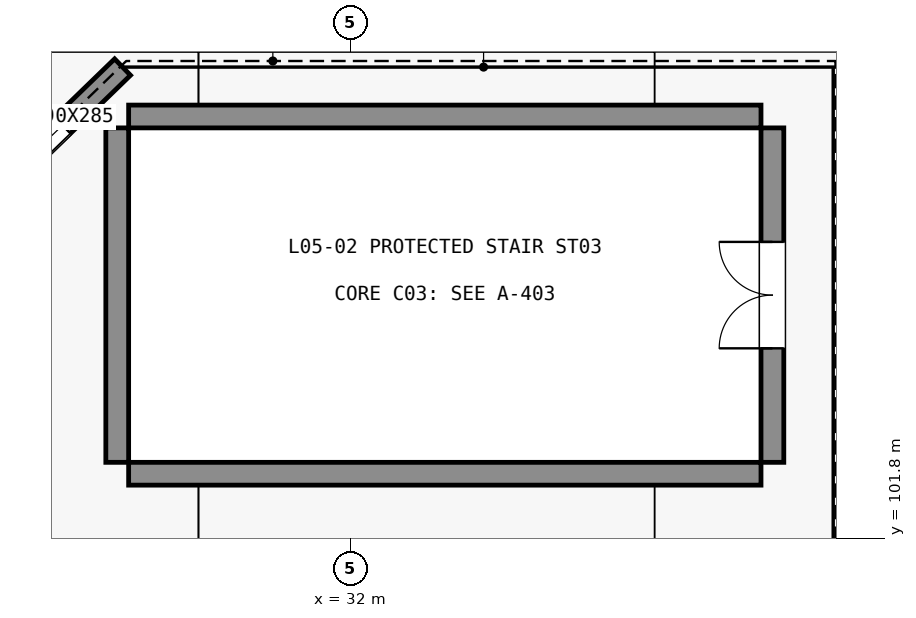
"""IFC4 building model, lengths in metres.
Left out: names, types, materials, properties, quantities, classifications, styles, units other than length and angle.
Written with IfcOpenShell. Run it as: python <this file> out.ifc"""

import sys

from ifc_helpers import new_model, si_unit, direction, frame, frame_2d, origin, place, context, subcontext, project, spatial, rectangle, extrude, element, fill, save


model = new_model("IFC4")
c1 = context("Model", 3, precision=1e-05, world=origin(), true_north=direction((0.0, 1.0)))
c2 = subcontext(c1, "Body", "Model", "MODEL_VIEW")
j1 = project(units=[si_unit("LENGTHUNIT", "METRE"), si_unit("PLANEANGLEUNIT", "RADIAN")], contexts=[c1])
p1 = place(None, origin())
s1 = spatial("IfcSite", under=j1, at=p1, CompositionType="ELEMENT")
p2 = place(p1, origin())
s2 = spatial("IfcBuilding", under=s1, at=p2, CompositionType="ELEMENT")
p3 = place(p2, frame((0.0, 0.0, 26.4)))
s3 = spatial("IfcBuildingStorey", under=s2, at=p3, CompositionType="ELEMENT", Elevation=26.4)
for number, where, z_axis, x_axis in (
    (1, (29.08, 102.65, 0.0), (0.0, 0.0, 1.0), (1.0, 0.0, 0.0)),
    (2, (29.08, 107.35, 0.0), (0.0, 0.0, 1.0), (1.0, 0.0, 0.0)),
):
    element("IfcWall", number, at=place(p3, frame(where, z_axis=z_axis, x_axis=x_axis)), inside=s3, PredefinedType="SHEAR", context=c2, shape_type="SweptSolid", body=[
        extrude(rectangle(XDim=8.32, YDim=0.3, at=frame_2d((4.16, 0.0))), origin(), (0.0, 0.0, 1.0), 5.18),
    ])
p4 = place(p3, frame((28.93, 102.8, 0.0), z_axis=(0.0, 0.0, 1.0), x_axis=(0.0, 1.0, 0.0)))
e3 = element("IfcWall", 3, at=p4, inside=s3, PredefinedType="SHEAR", context=c2, shape_type="SweptSolid", body=[
    extrude(rectangle(XDim=4.4, YDim=0.3, at=frame_2d((2.2, 0.0))), origin(), (0.0, 0.0, 1.0), 5.18),
])
p5 = place(p3, frame((37.55, 102.8, 0.0), z_axis=(0.0, 0.0, 1.0), x_axis=(0.0, 1.0, 0.0)))
e4 = element("IfcWall", 4, at=p5, inside=s3, PredefinedType="SHEAR", context=c2, shape_type="SweptSolid", body=[
    extrude(rectangle(XDim=4.4, YDim=0.3, at=frame_2d((2.2, 0.0))), origin(), (0.0, 0.0, 1.0), 5.18),
])
p6 = place(p5, frame((1.5, 0.0, 0.0)))
e5 = element("IfcOpeningElement", 5, at=p6, cuts=e4, PredefinedType="OPENING", context=c2, shape_type="SweptSolid", body=[
    extrude(rectangle(XDim=1.4, YDim=2.2, at=frame_2d((0.7, 1.1))), frame((0.0, 0.16, 0.0), z_axis=(0.0, -1.0, 0.0), x_axis=(1.0, 0.0, 0.0)), (0.0, 0.0, 1.0), 0.32),
])
p7 = place(p3, frame((29.0, 108.0, 0.0), z_axis=(0.0, 0.0, 1.0), x_axis=(-0.718244287729, -0.695791019736, 0.0)))
e6 = element("IfcWall", 6, at=p7, inside=s3, PredefinedType="STANDARD", context=c2, shape_type="SweptSolid", body=[
    extrude(rectangle(XDim=17.821, YDim=0.3, at=frame_2d((8.911, 0.0))), origin(), (0.0, 0.0, 1.0), 5.18),
])
p8 = place(p7, frame((1.1, 0.0, 0.95)))
e7 = element("IfcOpeningElement", 7, at=p8, cuts=e6, PredefinedType="OPENING", context=c2, shape_type="SweptSolid", body=[
    extrude(rectangle(XDim=0.9, YDim=2.85, at=frame_2d((0.45, 1.425))), frame((0.0, 0.16, 0.0), z_axis=(0.0, -1.0, 0.0), x_axis=(1.0, 0.0, 0.0)), (0.0, 0.0, 1.0), 0.32),
])
p9 = place(p7, frame((2.45, 0.0, 0.95)))
e8 = element("IfcOpeningElement", 8, at=p9, cuts=e6, PredefinedType="OPENING", context=c2, shape_type="SweptSolid", body=[
    extrude(rectangle(XDim=0.9, YDim=2.85, at=frame_2d((0.45, 1.425))), frame((0.0, 0.16, 0.0), z_axis=(0.0, -1.0, 0.0), x_axis=(1.0, 0.0, 0.0)), (0.0, 0.0, 1.0), 0.32),
])
p10 = place(p7, frame((7.5, 0.0, 0.95)))
e9 = element("IfcOpeningElement", 9, at=p10, cuts=e6, PredefinedType="OPENING", context=c2, shape_type="SweptSolid", body=[
    extrude(rectangle(XDim=0.9, YDim=2.85, at=frame_2d((0.45, 1.425))), frame((0.0, 0.16, 0.0), z_axis=(0.0, -1.0, 0.0), x_axis=(1.0, 0.0, 0.0)), (0.0, 0.0, 1.0), 0.32),
])
p11 = place(p7, frame((8.85, 0.0, 0.95)))
e10 = element("IfcOpeningElement", 10, at=p11, cuts=e6, PredefinedType="OPENING", context=c2, shape_type="SweptSolid", body=[
    extrude(rectangle(XDim=0.9, YDim=2.85, at=frame_2d((0.45, 1.425))), frame((0.0, 0.16, 0.0), z_axis=(0.0, -1.0, 0.0), x_axis=(1.0, 0.0, 0.0)), (0.0, 0.0, 1.0), 0.32),
])
p12 = place(p7, frame((10.7, 0.0, 0.95)))
e11 = element("IfcOpeningElement", 11, at=p12, cuts=e6, PredefinedType="OPENING", context=c2, shape_type="SweptSolid", body=[
    extrude(rectangle(XDim=0.9, YDim=2.85, at=frame_2d((0.45, 1.425))), frame((0.0, 0.16, 0.0), z_axis=(0.0, -1.0, 0.0), x_axis=(1.0, 0.0, 0.0)), (0.0, 0.0, 1.0), 0.32),
])
p13 = place(p7, frame((12.05, 0.0, 0.95)))
e12 = element("IfcOpeningElement", 12, at=p13, cuts=e6, PredefinedType="OPENING", context=c2, shape_type="SweptSolid", body=[
    extrude(rectangle(XDim=0.9, YDim=2.85, at=frame_2d((0.45, 1.425))), frame((0.0, 0.16, 0.0), z_axis=(0.0, -1.0, 0.0), x_axis=(1.0, 0.0, 0.0)), (0.0, 0.0, 1.0), 0.32),
])
p14 = place(p7, frame((13.9, 0.0, 0.95)))
e13 = element("IfcOpeningElement", 13, at=p14, cuts=e6, PredefinedType="OPENING", context=c2, shape_type="SweptSolid", body=[
    extrude(rectangle(XDim=0.9, YDim=2.85, at=frame_2d((0.45, 1.425))), frame((0.0, 0.16, 0.0), z_axis=(0.0, -1.0, 0.0), x_axis=(1.0, 0.0, 0.0)), (0.0, 0.0, 1.0), 0.32),
])
p15 = place(p7, frame((15.25, 0.0, 0.95)))
e14 = element("IfcOpeningElement", 14, at=p15, cuts=e6, PredefinedType="OPENING", context=c2, shape_type="SweptSolid", body=[
    extrude(rectangle(XDim=0.9, YDim=2.85, at=frame_2d((0.45, 1.425))), frame((0.0, 0.16, 0.0), z_axis=(0.0, -1.0, 0.0), x_axis=(1.0, 0.0, 0.0)), (0.0, 0.0, 1.0), 0.32),
])
p16 = place(p8, origin())
e15 = element("IfcWindow", 15, at=p16, inside=s3, PartitioningType="DOUBLE_PANEL_VERTICAL", PredefinedType="WINDOW", context=c2, shape_type="SweptSolid", body=[
    extrude(rectangle(XDim=0.9, YDim=2.85, at=frame_2d((0.45, 1.425))), frame((0.0, 0.03, 0.0), z_axis=(0.0, -1.0, 0.0), x_axis=(1.0, 0.0, 0.0)), (0.0, 0.0, 1.0), 0.06),
])
fill(e7, e15)
p17 = place(p6, origin())
e16 = element("IfcDoor", 16, at=p17, inside=s3, OperationType="DOUBLE_DOOR_SINGLE_SWING", PredefinedType="DOOR", context=c2, shape_type="SweptSolid", body=[
    extrude(rectangle(XDim=1.4, YDim=2.2, at=frame_2d((0.7, 1.1))), frame((0.0, 0.025, 0.0), z_axis=(0.0, -1.0, 0.0), x_axis=(1.0, 0.0, 0.0)), (0.0, 0.0, 1.0), 0.05),
])
fill(e5, e16)
save(model, sys.argv[1])
